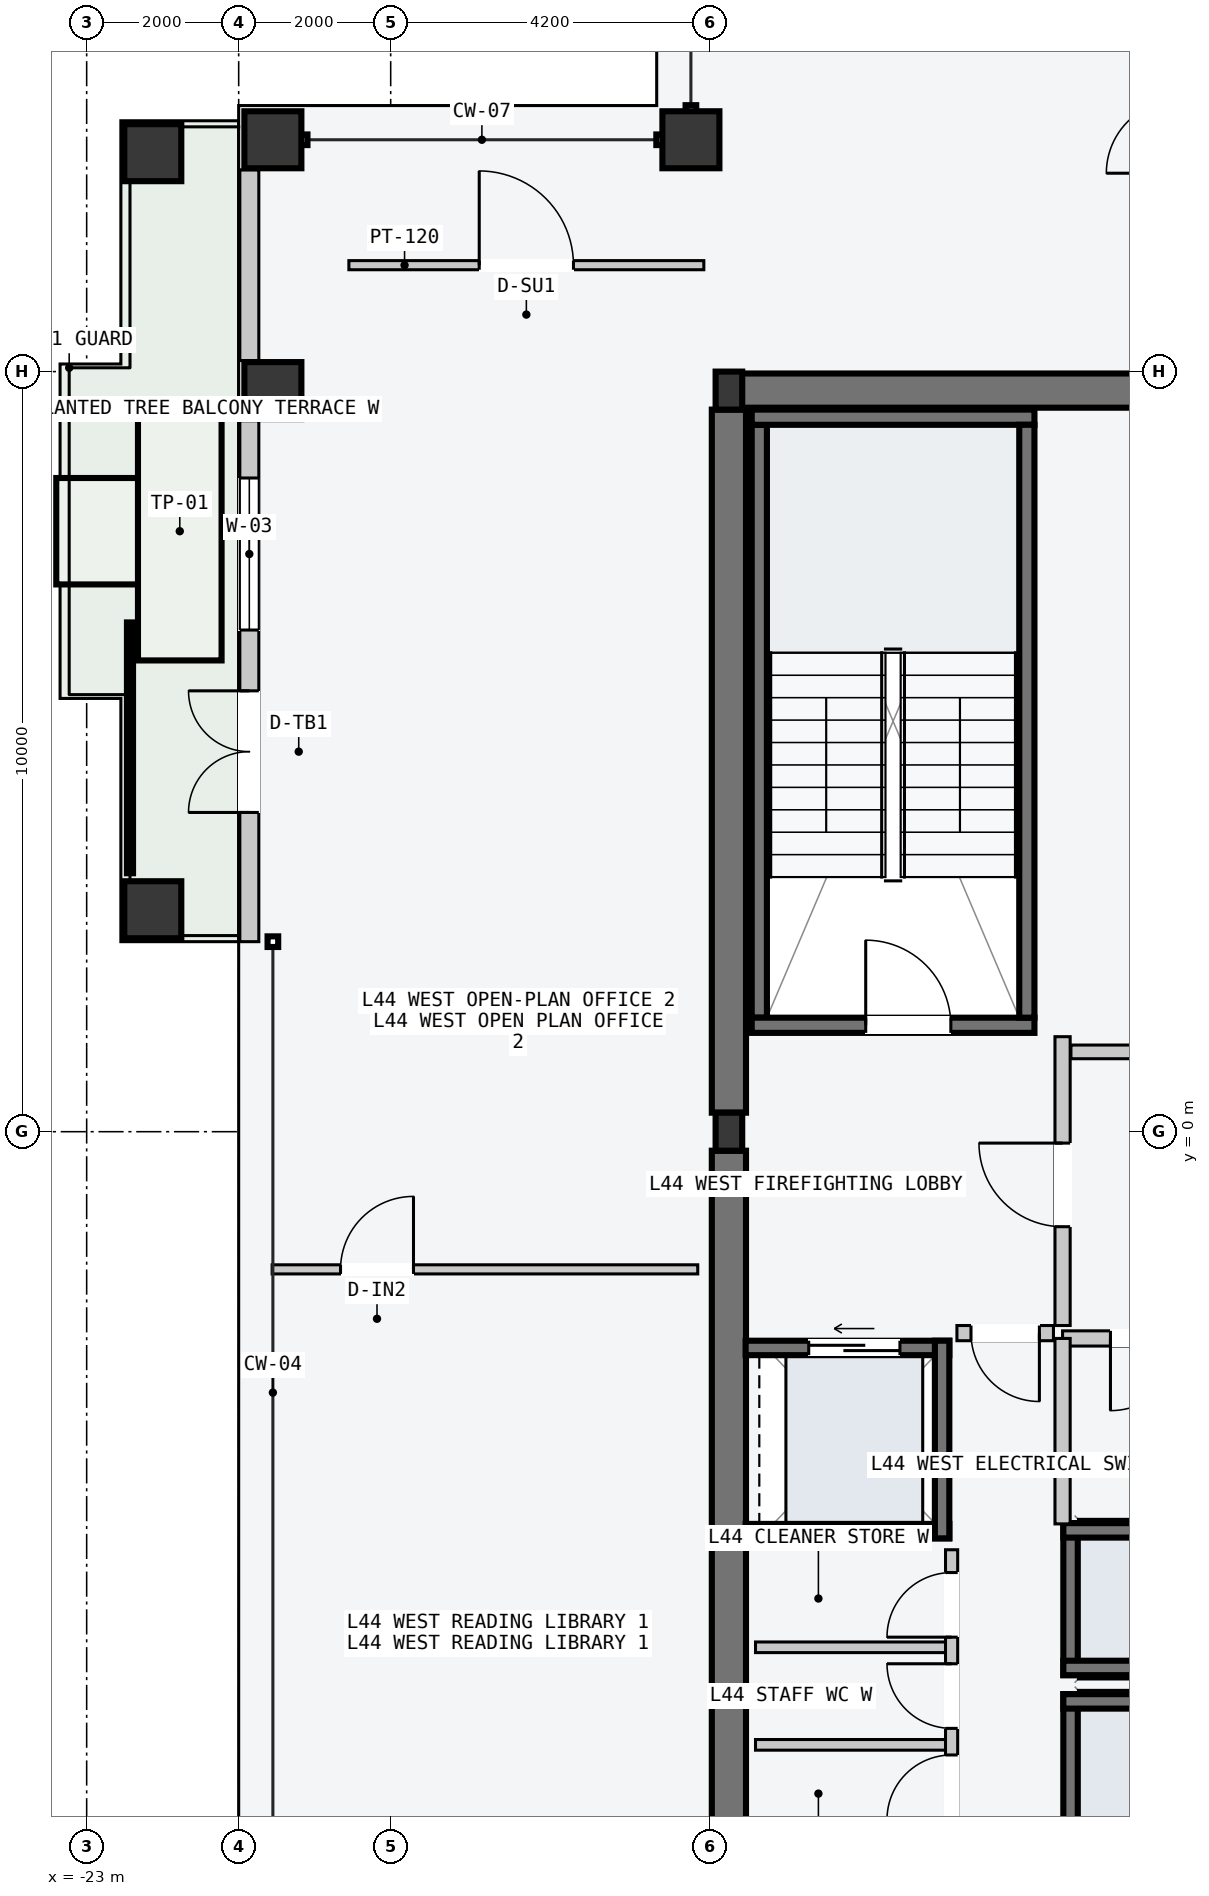
"""IFC4 building model, lengths in metres.
Left out: names, types, materials, properties, quantities, classifications, styles, units other than length and angle.
Written with IfcOpenShell. Run it as: python <this file> out.ifc"""

import sys

from ifc_helpers import new_model, si_unit, direction, frame, frame_2d, origin, origin_2d, place, context, subcontext, project, spatial, rectangle, hollow_rectangle, i_section, extrude, element, fill, save


model = new_model("IFC4")
c1 = context("Model", 3, precision=1e-05, world=origin(), true_north=direction((0.0, 1.0)))
c2 = subcontext(c1, "Body", "Model", "MODEL_VIEW")
j1 = project(units=[si_unit("LENGTHUNIT", "METRE"), si_unit("PLANEANGLEUNIT", "RADIAN")], contexts=[c1])
p1 = place(None, origin())
s1 = spatial("IfcSite", under=j1, at=p1, CompositionType="ELEMENT")
p2 = place(p1, origin())
s2 = spatial("IfcBuilding", under=s1, at=p2, CompositionType="ELEMENT")
p3 = place(p2, frame((0.0, 0.0, 169.5)))
s3 = spatial("IfcBuildingStorey", under=s2, at=p3, CompositionType="ELEMENT", Elevation=169.5)
p4 = place(p3, frame((-14.53, 9.75, -0.2), z_axis=(0.0, 0.0, 1.0), x_axis=(1.0, 0.0, 0.0)))
e1 = element("IfcWall", 1, at=p4, inside=s3, PredefinedType="SHEAR", context=c2, shape_type="SweptSolid", body=[
    extrude(rectangle(XDim=6.46, YDim=0.45, at=frame_2d((3.23, 0.0))), origin(), (0.0, 0.0, 1.0), 3.6),
])
for number, where, z_axis, x_axis in (
    (2, (-14.55, -9.5, -0.2), (0.0, 0.0, 1.0), (0.0, 1.0, 0.0)),
    (3, (-14.55, 0.25, -0.2), (0.0, 0.0, 1.0), (0.0, 1.0, 0.0)),
):
    element("IfcWall", number, at=place(p3, frame(where, z_axis=z_axis, x_axis=x_axis)), inside=s3, PredefinedType="SHEAR", context=c2, shape_type="SweptSolid", body=[
        extrude(rectangle(XDim=9.25, YDim=0.45, at=frame_2d((4.625, 0.0))), origin(), (0.0, 0.0, 1.0), 3.6),
    ])
p5 = place(p3, frame((-14.15, 1.5, -0.2), z_axis=(0.0, 0.0, 1.0), x_axis=(0.0, 1.0, 0.0)))
e4 = element("IfcWall", 4, at=p5, inside=s3, PredefinedType="SOLIDWALL", context=c2, shape_type="SweptSolid", body=[
    extrude(rectangle(XDim=7.8, YDim=0.2, at=frame_2d((3.9, 0.0))), origin(), (0.0, 0.0, 1.0), 3.6),
])
p6 = place(p3, frame((-14.25, 1.4, -0.2), z_axis=(0.0, 0.0, 1.0), x_axis=(1.0, 0.0, 0.0)))
e5 = element("IfcWall", 5, at=p6, inside=s3, PredefinedType="SOLIDWALL", context=c2, shape_type="SweptSolid", body=[
    extrude(rectangle(XDim=3.72, YDim=0.2, at=frame_2d((1.86, 0.0))), origin(), (0.0, 0.0, 1.0), 3.6),
])
p7 = place(p6, frame((1.5, 0.0, 0.2)))
e6 = element("IfcOpeningElement", 6, at=p7, cuts=e5, PredefinedType="OPENING", context=c2, shape_type="SweptSolid", body=[
    extrude(rectangle(XDim=1.12, YDim=2.18, at=frame_2d((0.56, 1.09))), frame((0.0, 0.11, 0.0), z_axis=(0.0, -1.0, 0.0), x_axis=(1.0, 0.0, 0.0)), (0.0, 0.0, 1.0), 0.22),
])
p8 = place(p3, frame((-14.25, 9.4, -0.2), z_axis=(0.0, 0.0, 1.0), x_axis=(1.0, 0.0, 0.0)))
e7 = element("IfcWall", 7, at=p8, inside=s3, PredefinedType="SOLIDWALL", context=c2, shape_type="SweptSolid", body=[
    extrude(rectangle(XDim=3.72, YDim=0.2, at=frame_2d((1.86, 0.0))), origin(), (0.0, 0.0, 1.0), 3.6),
])
p9 = place(p3, frame((-10.63, 1.5, -0.2), z_axis=(0.0, 0.0, 1.0), x_axis=(0.0, 1.0, 0.0)))
e8 = element("IfcWall", 8, at=p9, inside=s3, PredefinedType="SOLIDWALL", context=c2, shape_type="SweptSolid", body=[
    extrude(rectangle(XDim=7.8, YDim=0.2, at=frame_2d((3.9, 0.0))), origin(), (0.0, 0.0, 1.0), 3.6),
])
for number, where, z_axis, x_axis in (
    (9, (-14.55, 0.0, 0.0), (0.0, 0.0, 1.0), (1.0, 0.0, 0.0)),
    (10, (-14.55, 9.75, 0.0), (0.0, 0.0, 1.0), (1.0, 0.0, 0.0)),
):
    element("IfcColumn", number, at=place(p3, frame(where, z_axis=z_axis, x_axis=x_axis)), inside=s3, PredefinedType="COLUMN", context=c2, shape_type="SweptSolid", body=[
        extrude(i_section(OverallWidth=0.35, OverallDepth=0.5, WebThickness=0.02, FlangeThickness=0.032, at=origin_2d()), origin(), (0.0, 0.0, 1.0), 3.6),
    ])
for number, where, z_axis, x_axis in (
    (11, (-20.55, 9.75, 0.0), (0.0, 0.0, 1.0), (0.0, 1.0, 0.0)),
    (12, (-20.55, 13.05, 0.0), (0.0, 0.0, 1.0), (0.0, 1.0, 0.0)),
    (13, (-15.05, 13.05, 0.0), (0.0, 0.0, 1.0), (1.0, 0.0, 0.0)),
    (14, (-22.13, 2.92, 0.0), (0.0, 0.0, 1.0), (0.0, 1.0, 0.0)),
    (15, (-22.13, 12.88, 0.0), (0.0, 0.0, 1.0), (0.0, 1.0, 0.0)),
):
    element("IfcColumn", number, at=place(p3, frame(where, z_axis=z_axis, x_axis=x_axis)), inside=s3, PredefinedType="COLUMN", context=c2, shape_type="SweptSolid", body=[
        extrude(hollow_rectangle(XDim=0.75, YDim=0.75, WallThickness=0.032, at=origin_2d()), origin(), (0.0, 0.0, 1.0), 3.6),
    ])
p10 = place(p3, frame((-20.86, 2.5, 0.0), z_axis=(0.0, 0.0, 1.0), x_axis=(0.0, 1.0, 0.0)))
e16 = element("IfcWall", 16, at=p10, inside=s3, PredefinedType="STANDARD", context=c2, shape_type="SweptSolid", body=[
    extrude(rectangle(XDim=6.855, YDim=0.25, at=frame_2d((3.427, 0.0))), origin(), (0.0, 0.0, 1.0), 3.4),
])
p11 = place(p10, frame((1.7, 0.0, 0.0)))
e17 = element("IfcOpeningElement", 17, at=p11, cuts=e16, PredefinedType="OPENING", context=c2, shape_type="SweptSolid", body=[
    extrude(rectangle(XDim=1.6, YDim=2.2, at=frame_2d((0.8, 1.1))), frame((0.0, 0.135, 0.0), z_axis=(0.0, -1.0, 0.0), x_axis=(1.0, 0.0, 0.0)), (0.0, 0.0, 1.0), 0.27),
])
p12 = place(p10, frame((4.1, 0.0, 0.85)))
e18 = element("IfcOpeningElement", 18, at=p12, cuts=e16, PredefinedType="OPENING", context=c2, shape_type="SweptSolid", body=[
    extrude(rectangle(XDim=2.0, YDim=2.1, at=frame_2d((1.0, 1.05))), frame((0.0, 0.135, 0.0), z_axis=(0.0, -1.0, 0.0), x_axis=(1.0, 0.0, 0.0)), (0.0, 0.0, 1.0), 0.27),
])
p13 = place(p3, frame((-20.86, 10.145, 0.0), z_axis=(0.0, 0.0, 1.0), x_axis=(0.0, 1.0, 0.0)))
e19 = element("IfcWall", 19, at=p13, inside=s3, PredefinedType="STANDARD", context=c2, shape_type="SweptSolid", body=[
    extrude(rectangle(XDim=2.51, YDim=0.25, at=frame_2d((1.255, 0.0))), origin(), (0.0, 0.0, 1.0), 3.4),
])
p14 = place(p3, frame((-10.055, -9.52, -0.2), z_axis=(0.0, 0.0, 1.0), x_axis=(0.0, 1.0, 0.0)))
e20 = element("IfcWall", 20, at=p14, inside=s3, PredefinedType="SOLIDWALL", context=c2, shape_type="SweptSolid", body=[
    extrude(rectangle(XDim=2.12, YDim=0.19, at=frame_2d((1.06, 0.0))), origin(), (0.0, 0.0, 1.0), 3.6),
])
p15 = place(p3, frame((-10.15, -7.495, -0.2), z_axis=(0.0, 0.0, 1.0), x_axis=(1.0, 0.0, 0.0)))
e21 = element("IfcWall", 21, at=p15, inside=s3, PredefinedType="SOLIDWALL", context=c2, shape_type="SweptSolid", body=[
    extrude(rectangle(XDim=2.2, YDim=0.19, at=frame_2d((1.1, 0.0))), origin(), (0.0, 0.0, 1.0), 3.6),
])
p16 = place(p3, frame((-10.055, -7.15, -0.2), z_axis=(0.0, 0.0, 1.0), x_axis=(0.0, 1.0, 0.0)))
e22 = element("IfcWall", 22, at=p16, inside=s3, PredefinedType="SOLIDWALL", context=c2, shape_type="SweptSolid", body=[
    extrude(rectangle(XDim=2.0, YDim=0.19, at=frame_2d((1.0, 0.0))), origin(), (0.0, 0.0, 1.0), 3.6),
])
for number, where, z_axis, x_axis in (
    (23, (-10.15, -5.245, -0.2), (0.0, 0.0, 1.0), (1.0, 0.0, 0.0)),
    (24, (-10.15, -7.055, -0.2), (0.0, 0.0, 1.0), (1.0, 0.0, 0.0)),
):
    element("IfcWall", number, at=place(p3, frame(where, z_axis=z_axis, x_axis=x_axis)), inside=s3, PredefinedType="SOLIDWALL", context=c2, shape_type="SweptSolid", body=[
        extrude(rectangle(XDim=2.2, YDim=0.19, at=frame_2d((1.1, 0.0))), origin(), (0.0, 0.0, 1.0), 3.6),
    ])
p17 = place(p3, frame((-14.33, -2.845, -0.2), z_axis=(0.0, 0.0, 1.0), x_axis=(1.0, 0.0, 0.0)))
e25 = element("IfcWall", 25, at=p17, inside=s3, PredefinedType="SOLIDWALL", context=c2, shape_type="SweptSolid", body=[
    extrude(rectangle(XDim=2.68, YDim=0.19, at=frame_2d((1.34, 0.0))), origin(), (0.0, 0.0, 1.0), 3.6),
])
p18 = place(p17, frame((0.83, 0.0, 0.2)))
e26 = element("IfcOpeningElement", 26, at=p18, cuts=e25, PredefinedType="OPENING", context=c2, shape_type="SweptSolid", body=[
    extrude(rectangle(XDim=1.2, YDim=2.2, at=frame_2d((0.6, 1.1))), frame((0.0, 0.105, 0.0), z_axis=(0.0, -1.0, 0.0), x_axis=(1.0, 0.0, 0.0)), (0.0, 0.0, 1.0), 0.21),
])
p19 = place(p3, frame((-14.33, -5.255, -0.2), z_axis=(0.0, 0.0, 1.0), x_axis=(1.0, 0.0, 0.0)))
e27 = element("IfcWall", 27, at=p19, inside=s3, PredefinedType="SOLIDWALL", context=c2, shape_type="SweptSolid", body=[
    extrude(rectangle(XDim=2.68, YDim=0.19, at=frame_2d((1.34, 0.0))), origin(), (0.0, 0.0, 1.0), 3.6),
])
p20 = place(p3, frame((-11.745, -5.35, -0.2), z_axis=(0.0, 0.0, 1.0), x_axis=(0.0, 1.0, 0.0)))
e28 = element("IfcWall", 28, at=p20, inside=s3, PredefinedType="SOLIDWALL", context=c2, shape_type="SweptSolid", body=[
    extrude(rectangle(XDim=2.6, YDim=0.19, at=frame_2d((1.3, 0.0))), origin(), (0.0, 0.0, 1.0), 3.6),
])
p21 = place(p3, frame((-10.16, -2.55, 0.0), z_axis=(0.0, 0.0, 1.0), x_axis=(0.0, 1.0, 0.0)))
e29 = element("IfcWall", 29, at=p21, inside=s3, PredefinedType="PARTITIONING", context=c2, shape_type="SweptSolid", body=[
    extrude(rectangle(XDim=3.8, YDim=0.2, at=frame_2d((1.9, 0.0))), origin(), (0.0, 0.0, 1.0), 3.4),
])
p22 = place(p21, frame((1.3, 0.0, 0.0)))
e30 = element("IfcOpeningElement", 30, at=p22, cuts=e29, PredefinedType="OPENING", context=c2, shape_type="SweptSolid", body=[
    extrude(rectangle(XDim=1.1, YDim=2.15, at=frame_2d((0.55, 1.075))), frame((0.0, 0.11, 0.0), z_axis=(0.0, -1.0, 0.0), x_axis=(1.0, 0.0, 0.0)), (0.0, 0.0, 1.0), 0.22),
])
p23 = place(p3, frame((-10.28, -2.65, 0.0), z_axis=(0.0, 0.0, 1.0), x_axis=(-1.0, 0.0, 0.0)))
e31 = element("IfcWall", 31, at=p23, inside=s3, PredefinedType="PARTITIONING", context=c2, shape_type="SweptSolid", body=[
    extrude(rectangle(XDim=1.27, YDim=0.2, at=frame_2d((0.635, 0.0))), origin(), (0.0, 0.0, 1.0), 3.4),
])
p24 = place(p23, frame((0.185, 0.0, 0.0)))
e32 = element("IfcOpeningElement", 32, at=p24, cuts=e31, PredefinedType="OPENING", context=c2, shape_type="SweptSolid", body=[
    extrude(rectangle(XDim=0.9, YDim=2.15, at=frame_2d((0.45, 1.075))), frame((0.0, 0.11, 0.0), z_axis=(0.0, -1.0, 0.0), x_axis=(1.0, 0.0, 0.0)), (0.0, 0.0, 1.0), 0.22),
])
p25 = place(p3, frame((-7.96, -2.72, 0.0), z_axis=(0.0, 0.0, 1.0), x_axis=(-1.0, 0.0, 0.0)))
e33 = element("IfcWall", 33, at=p25, inside=s3, PredefinedType="PARTITIONING", context=c2, shape_type="SweptSolid", body=[
    extrude(rectangle(XDim=2.2, YDim=0.2, at=frame_2d((1.1, 0.0))), origin(), (0.0, 0.0, 1.0), 3.4),
])
p26 = place(p25, frame((0.62, 0.0, 0.0)))
e34 = element("IfcOpeningElement", 34, at=p26, cuts=e33, PredefinedType="OPENING", context=c2, shape_type="SweptSolid", body=[
    extrude(rectangle(XDim=0.95, YDim=2.1, at=frame_2d((0.475, 1.05))), frame((0.0, 0.11, 0.0), z_axis=(0.0, -1.0, 0.0), x_axis=(1.0, 0.0, 0.0)), (0.0, 0.0, 1.0), 0.22),
])
p27 = place(p3, frame((-10.16, -5.16, 0.0), z_axis=(0.0, 0.0, 1.0), x_axis=(0.0, 1.0, 0.0)))
e35 = element("IfcWall", 35, at=p27, inside=s3, PredefinedType="PARTITIONING", context=c2, shape_type="SweptSolid", body=[
    extrude(rectangle(XDim=2.44, YDim=0.2, at=frame_2d((1.22, 0.0))), origin(), (0.0, 0.0, 1.0), 3.4),
])
for number, where, z_axis, x_axis in (
    (36, (-11.7, -8.067, 0.0), (0.0, 0.0, 1.0), (-1.0, 0.0, 0.0)),
    (37, (-11.7, -6.783, 0.0), (0.0, 0.0, 1.0), (-1.0, 0.0, 0.0)),
):
    element("IfcWall", number, at=place(p3, frame(where, z_axis=z_axis, x_axis=x_axis)), inside=s3, PredefinedType="PARTITIONING", context=c2, shape_type="SweptSolid", body=[
        extrude(rectangle(XDim=2.5, YDim=0.14, at=frame_2d((1.25, 0.0))), origin(), (0.0, 0.0, 1.0), 3.4),
    ])
p28 = place(p3, frame((-11.62, -9.35, 0.0), z_axis=(0.0, 0.0, 1.0), x_axis=(0.0, 1.0, 0.0)))
e38 = element("IfcWall", 38, at=p28, inside=s3, PredefinedType="PARTITIONING", context=c2, shape_type="SweptSolid", body=[
    extrude(rectangle(XDim=3.85, YDim=0.16, at=frame_2d((1.925, 0.0))), origin(), (0.0, 0.0, 1.0), 3.4),
])
p29 = place(p28, frame((0.3, 0.0, 0.0)))
e39 = element("IfcOpeningElement", 39, at=p29, cuts=e38, PredefinedType="OPENING", context=c2, shape_type="SweptSolid", body=[
    extrude(rectangle(XDim=0.85, YDim=2.12, at=frame_2d((0.425, 1.06))), frame((0.0, 0.09, 0.0), z_axis=(0.0, -1.0, 0.0), x_axis=(1.0, 0.0, 0.0)), (0.0, 0.0, 1.0), 0.18),
])
p30 = place(p28, frame((1.5, 0.0, 0.0)))
e40 = element("IfcOpeningElement", 40, at=p30, cuts=e38, PredefinedType="OPENING", context=c2, shape_type="SweptSolid", body=[
    extrude(rectangle(XDim=0.85, YDim=2.12, at=frame_2d((0.425, 1.06))), frame((0.0, 0.09, 0.0), z_axis=(0.0, -1.0, 0.0), x_axis=(1.0, 0.0, 0.0)), (0.0, 0.0, 1.0), 0.18),
])
p31 = place(p28, frame((2.7, 0.0, 0.0)))
e41 = element("IfcOpeningElement", 41, at=p31, cuts=e38, PredefinedType="OPENING", context=c2, shape_type="SweptSolid", body=[
    extrude(rectangle(XDim=0.85, YDim=2.12, at=frame_2d((0.425, 1.06))), frame((0.0, 0.09, 0.0), z_axis=(0.0, -1.0, 0.0), x_axis=(1.0, 0.0, 0.0)), (0.0, 0.0, 1.0), 0.18),
])
p32 = place(p3, frame((-10.05, 1.05, 0.0), z_axis=(0.0, 0.0, 1.0), x_axis=(1.0, 0.0, 0.0)))
e42 = element("IfcWall", 42, at=p32, inside=s3, PredefinedType="PARTITIONING", context=c2, shape_type="SweptSolid", body=[
    extrude(rectangle(XDim=8.79, YDim=0.18, at=frame_2d((4.395, 0.0))), origin(), (0.0, 0.0, 1.0), 3.4),
])
p33 = place(p3, frame((-19.55, 11.4, 0.0), z_axis=(0.0, 0.0, 1.0), x_axis=(1.0, 0.0, 0.0)))
e43 = element("IfcWall", 43, at=p33, inside=s3, PredefinedType="PARTITIONING", context=c2, shape_type="SweptSolid", body=[
    extrude(rectangle(XDim=4.67, YDim=0.12, at=frame_2d((2.335, 0.0))), origin(), (0.0, 0.0, 1.0), 3.4),
])
p34 = place(p33, frame((1.715, 0.0, 0.0)))
e44 = element("IfcOpeningElement", 44, at=p34, cuts=e43, PredefinedType="OPENING", context=c2, shape_type="SweptSolid", body=[
    extrude(rectangle(XDim=1.24, YDim=2.24, at=frame_2d((0.62, 1.12))), frame((0.0, 0.07, 0.0), z_axis=(0.0, -1.0, 0.0), x_axis=(1.0, 0.0, 0.0)), (0.0, 0.0, 1.0), 0.14),
])
p35 = place(p3, frame((-20.56, -1.811, 0.0), z_axis=(0.0, 0.0, 1.0), x_axis=(1.0, 0.0, 0.0)))
e45 = element("IfcWall", 45, at=p35, inside=s3, PredefinedType="PARTITIONING", context=c2, shape_type="SweptSolid", body=[
    extrude(rectangle(XDim=5.6, YDim=0.12, at=frame_2d((2.8, 0.0))), origin(), (0.0, 0.0, 1.0), 3.4),
])
p36 = place(p35, frame((0.9, 0.0, 0.0)))
e46 = element("IfcOpeningElement", 46, at=p36, cuts=e45, PredefinedType="OPENING", context=c2, shape_type="SweptSolid", body=[
    extrude(rectangle(XDim=0.96, YDim=2.18, at=frame_2d((0.48, 1.09))), frame((0.0, 0.07, 0.0), z_axis=(0.0, -1.0, 0.0), x_axis=(1.0, 0.0, 0.0)), (0.0, 0.0, 1.0), 0.14),
])
p37 = place(p7, origin())
e47 = element("IfcDoor", 47, at=p37, inside=s3, OperationType="SINGLE_SWING_LEFT", PredefinedType="DOOR", context=c2, shape_type="SweptSolid", body=[
    extrude(rectangle(XDim=1.12, YDim=2.18, at=frame_2d((0.56, 1.09))), frame((0.0, 0.025, 0.0), z_axis=(0.0, -1.0, 0.0), x_axis=(1.0, 0.0, 0.0)), (0.0, 0.0, 1.0), 0.05),
])
fill(e6, e47)
p38 = place(p11, origin())
e48 = element("IfcDoor", 48, at=p38, inside=s3, OperationType="DOUBLE_DOOR_SINGLE_SWING", PredefinedType="DOOR", context=c2, shape_type="SweptSolid", body=[
    extrude(rectangle(XDim=1.6, YDim=2.2, at=frame_2d((0.8, 1.1))), frame((0.0, 0.025, 0.0), z_axis=(0.0, -1.0, 0.0), x_axis=(1.0, 0.0, 0.0)), (0.0, 0.0, 1.0), 0.05),
])
fill(e17, e48)
p39 = place(p12, origin())
e49 = element("IfcWindow", 49, at=p39, inside=s3, PartitioningType="SINGLE_PANEL", PredefinedType="WINDOW", context=c2, shape_type="SweptSolid", body=[
    extrude(rectangle(XDim=2.0, YDim=2.1, at=frame_2d((1.0, 1.05))), frame((0.0, 0.03, 0.0), z_axis=(0.0, -1.0, 0.0), x_axis=(1.0, 0.0, 0.0)), (0.0, 0.0, 1.0), 0.06),
])
fill(e18, e49)
p40 = place(p18, origin())
e50 = element("IfcDoor", 50, at=p40, inside=s3, OperationType="SLIDING_TO_LEFT", PredefinedType="DOOR", context=c2, shape_type="SweptSolid", body=[
    extrude(rectangle(XDim=1.2, YDim=2.2, at=frame_2d((0.6, 1.1))), frame((0.0, 0.025, 0.0), z_axis=(0.0, -1.0, 0.0), x_axis=(1.0, 0.0, 0.0)), (0.0, 0.0, 1.0), 0.05),
])
fill(e26, e50)
p41 = place(p22, origin())
e51 = element("IfcDoor", 51, at=p41, inside=s3, OperationType="SINGLE_SWING_RIGHT", PredefinedType="DOOR", context=c2, shape_type="SweptSolid", body=[
    extrude(rectangle(XDim=1.1, YDim=2.15, at=frame_2d((0.55, 1.075))), frame((0.0, 0.025, 0.0), z_axis=(0.0, -1.0, 0.0), x_axis=(1.0, 0.0, 0.0)), (0.0, 0.0, 1.0), 0.05),
])
fill(e30, e51)
p42 = place(p24, origin())
e52 = element("IfcDoor", 52, at=p42, inside=s3, OperationType="SINGLE_SWING_LEFT", PredefinedType="DOOR", context=c2, shape_type="SweptSolid", body=[
    extrude(rectangle(XDim=0.9, YDim=2.15, at=frame_2d((0.45, 1.075))), frame((0.0, 0.025, 0.0), z_axis=(0.0, -1.0, 0.0), x_axis=(1.0, 0.0, 0.0)), (0.0, 0.0, 1.0), 0.05),
])
fill(e32, e52)
p43 = place(p26, origin())
e53 = element("IfcDoor", 53, at=p43, inside=s3, OperationType="SINGLE_SWING_RIGHT", PredefinedType="DOOR", context=c2, shape_type="SweptSolid", body=[
    extrude(rectangle(XDim=0.95, YDim=2.1, at=frame_2d((0.475, 1.05))), frame((0.0, 0.025, 0.0), z_axis=(0.0, -1.0, 0.0), x_axis=(1.0, 0.0, 0.0)), (0.0, 0.0, 1.0), 0.05),
])
fill(e34, e53)
p44 = place(p29, origin())
e54 = element("IfcDoor", 54, at=p44, inside=s3, OperationType="SINGLE_SWING_LEFT", PredefinedType="DOOR", context=c2, shape_type="SweptSolid", body=[
    extrude(rectangle(XDim=0.85, YDim=2.12, at=frame_2d((0.425, 1.06))), frame((0.0, 0.025, 0.0), z_axis=(0.0, -1.0, 0.0), x_axis=(1.0, 0.0, 0.0)), (0.0, 0.0, 1.0), 0.05),
])
fill(e39, e54)
p45 = place(p30, origin())
e55 = element("IfcDoor", 55, at=p45, inside=s3, OperationType="SINGLE_SWING_RIGHT", PredefinedType="DOOR", context=c2, shape_type="SweptSolid", body=[
    extrude(rectangle(XDim=0.85, YDim=2.12, at=frame_2d((0.425, 1.06))), frame((0.0, 0.025, 0.0), z_axis=(0.0, -1.0, 0.0), x_axis=(1.0, 0.0, 0.0)), (0.0, 0.0, 1.0), 0.05),
])
fill(e40, e55)
p46 = place(p31, origin())
e56 = element("IfcDoor", 56, at=p46, inside=s3, OperationType="SINGLE_SWING_LEFT", PredefinedType="DOOR", context=c2, shape_type="SweptSolid", body=[
    extrude(rectangle(XDim=0.85, YDim=2.12, at=frame_2d((0.425, 1.06))), frame((0.0, 0.025, 0.0), z_axis=(0.0, -1.0, 0.0), x_axis=(1.0, 0.0, 0.0)), (0.0, 0.0, 1.0), 0.05),
])
fill(e41, e56)
p47 = place(p34, origin())
e57 = element("IfcDoor", 57, at=p47, inside=s3, OperationType="SINGLE_SWING_LEFT", PredefinedType="DOOR", context=c2, shape_type="SweptSolid", body=[
    extrude(rectangle(XDim=1.24, YDim=2.24, at=frame_2d((0.62, 1.12))), frame((0.0, 0.025, 0.0), z_axis=(0.0, -1.0, 0.0), x_axis=(1.0, 0.0, 0.0)), (0.0, 0.0, 1.0), 0.05),
])
fill(e44, e57)
p48 = place(p36, origin())
e58 = element("IfcDoor", 58, at=p48, inside=s3, OperationType="SINGLE_SWING_RIGHT", PredefinedType="DOOR", context=c2, shape_type="SweptSolid", body=[
    extrude(rectangle(XDim=0.96, YDim=2.18, at=frame_2d((0.48, 1.09))), frame((0.0, 0.025, 0.0), z_axis=(0.0, -1.0, 0.0), x_axis=(1.0, 0.0, 0.0)), (0.0, 0.0, 1.0), 0.05),
])
fill(e46, e58)
save(model, sys.argv[1])
